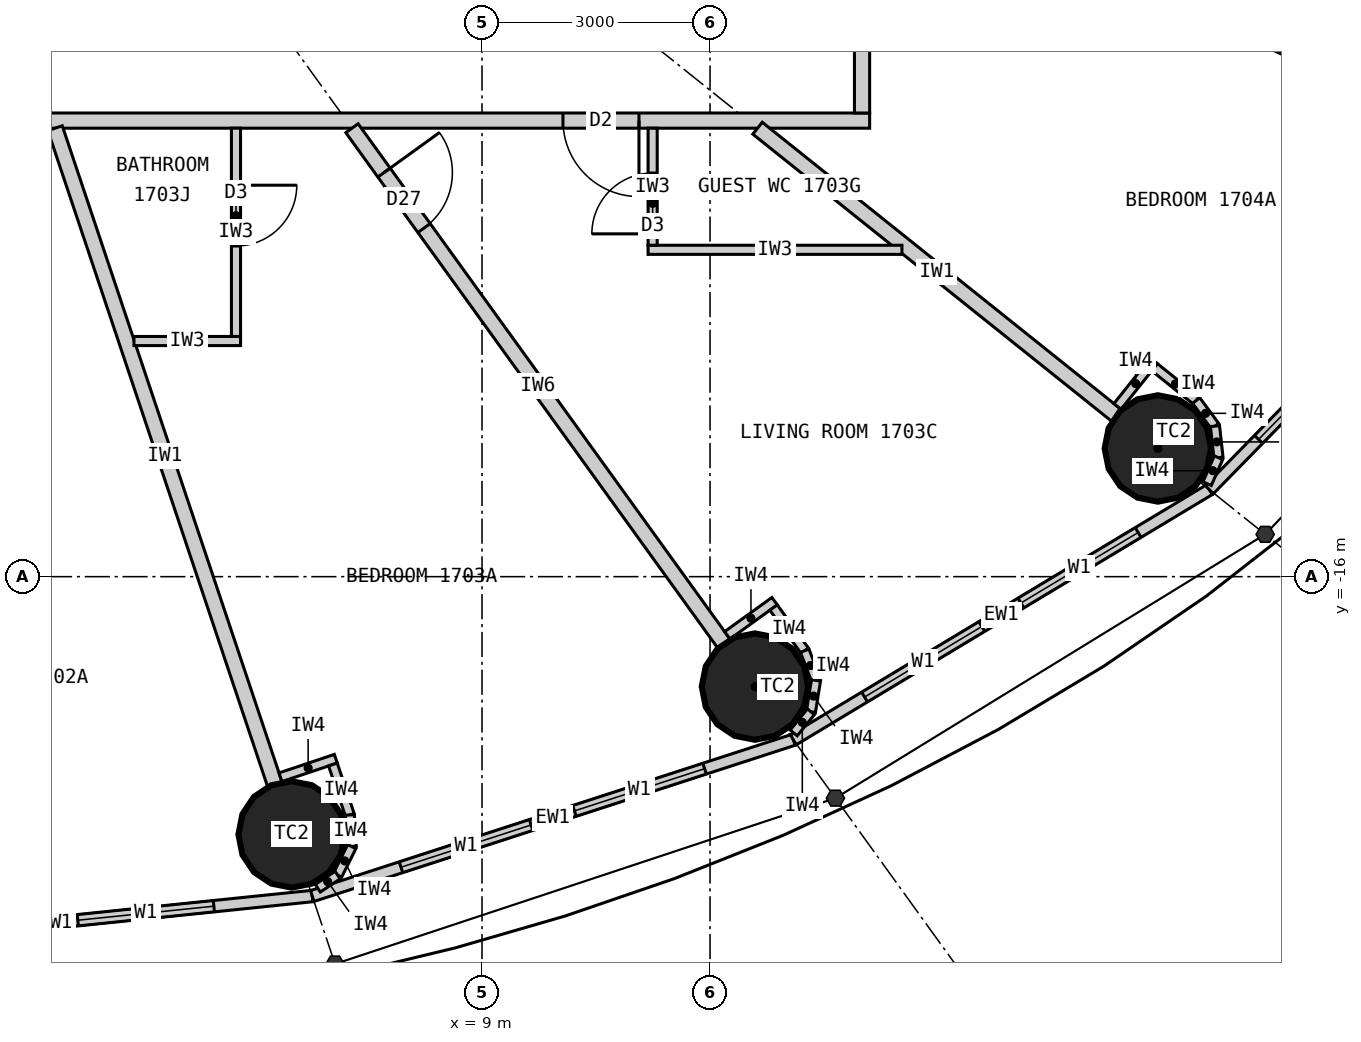
"""IFC4 building model, lengths in metres.
Left out: names, types, materials, properties, quantities, classifications, styles, units other than length and angle.
Written with IfcOpenShell. Run it as: python <this file> out.ifc"""

import sys

from ifc_helpers import new_model, si_unit, direction, frame, frame_2d, origin, origin_2d, place, context, subcontext, project, spatial, rectangle, circle, extrude, element, fill, save


model = new_model("IFC4")
c1 = context("Model", 3, precision=1e-05, world=origin(), true_north=direction((0.0, 1.0)))
c2 = subcontext(c1, "Body", "Model", "MODEL_VIEW")
j1 = project(units=[si_unit("LENGTHUNIT", "METRE"), si_unit("PLANEANGLEUNIT", "RADIAN")], contexts=[c1])
p1 = place(None, origin())
s1 = spatial("IfcSite", under=j1, at=p1, CompositionType="ELEMENT")
p2 = place(p1, origin())
s2 = spatial("IfcBuilding", under=s1, at=p2, CompositionType="ELEMENT")
p3 = place(p2, frame((0.0, 0.0, 70.5)))
s3 = spatial("IfcBuildingStorey", under=s2, at=p3, CompositionType="ELEMENT", Elevation=70.5)
for number, where, z_axis, x_axis in (
    (1, (6.495, -19.391, 0.0), (0.0, 0.0, 1.0), (1.0, 0.0, 0.0)),
    (2, (12.591, -17.447, 0.0), (0.0, 0.0, 1.0), (1.0, 0.0, 0.0)),
    (3, (17.892, -14.313, 0.0), (0.0, 0.0, 1.0), (1.0, 0.0, 0.0)),
):
    element("IfcColumn", number, at=place(p3, frame(where, z_axis=z_axis, x_axis=x_axis)), inside=s3, PredefinedType="COLUMN", context=c2, shape_type="SweptSolid", body=[
        extrude(circle(Radius=0.7, at=origin_2d()), origin(), (0.0, 0.0, 1.0), 3.3),
    ])
p4 = place(p3, frame((0.0, -20.9, 0.0), z_axis=(0.0, 0.0, 1.0), x_axis=(0.994721394369, 0.102612609291, 0.0)))
e4 = element("IfcWall", 4, at=p4, inside=s3, PredefinedType="ELEMENTEDWALL", context=c2, shape_type="SweptSolid", body=[
    extrude(rectangle(XDim=6.802, YDim=0.15, at=frame_2d((3.401, 0.0))), origin(), (0.0, 0.0, 1.0), 3.12),
])
p5 = place(p4, frame((1.301, 0.0, 0.9)))
e5 = element("IfcOpeningElement", 5, at=p5, cuts=e4, PredefinedType="OPENING", context=c2, shape_type="SweptSolid", body=[
    extrude(rectangle(XDim=1.8, YDim=1.9, at=frame_2d((0.9, 0.95))), frame((0.0, 0.085, 0.0), z_axis=(0.0, -1.0, 0.0), x_axis=(1.0, 0.0, 0.0)), (0.0, 0.0, 1.0), 0.17),
])
p6 = place(p4, frame((3.701, 0.0, 0.9)))
e6 = element("IfcOpeningElement", 6, at=p6, cuts=e4, PredefinedType="OPENING", context=c2, shape_type="SweptSolid", body=[
    extrude(rectangle(XDim=1.8, YDim=1.9, at=frame_2d((0.9, 0.95))), frame((0.0, 0.085, 0.0), z_axis=(0.0, -1.0, 0.0), x_axis=(1.0, 0.0, 0.0)), (0.0, 0.0, 1.0), 0.17),
])
p7 = place(p3, frame((6.766, -20.202, 0.0), z_axis=(0.0, 0.0, 1.0), x_axis=(0.951137534625, 0.308767534285, 0.0)))
e7 = element("IfcWall", 7, at=p7, inside=s3, PredefinedType="ELEMENTEDWALL", context=c2, shape_type="SweptSolid", body=[
    extrude(rectangle(XDim=6.655, YDim=0.15, at=frame_2d((3.328, 0.0))), origin(), (0.0, 0.0, 1.0), 3.12),
])
p8 = place(p7, frame((1.228, 0.0, 0.9)))
e8 = element("IfcOpeningElement", 8, at=p8, cuts=e7, PredefinedType="OPENING", context=c2, shape_type="SweptSolid", body=[
    extrude(rectangle(XDim=1.8, YDim=1.9, at=frame_2d((0.9, 0.95))), frame((0.0, 0.085, 0.0), z_axis=(0.0, -1.0, 0.0), x_axis=(1.0, 0.0, 0.0)), (0.0, 0.0, 1.0), 0.17),
])
p9 = place(p7, frame((3.628, 0.0, 0.9)))
e9 = element("IfcOpeningElement", 9, at=p9, cuts=e7, PredefinedType="OPENING", context=c2, shape_type="SweptSolid", body=[
    extrude(rectangle(XDim=1.8, YDim=1.9, at=frame_2d((0.9, 0.95))), frame((0.0, 0.085, 0.0), z_axis=(0.0, -1.0, 0.0), x_axis=(1.0, 0.0, 0.0)), (0.0, 0.0, 1.0), 0.17),
])
p10 = place(p3, frame((13.096, -18.147, 0.0), z_axis=(0.0, 0.0, 1.0), x_axis=(0.856983180864, 0.515344377787, 0.0)))
e10 = element("IfcWall", 10, at=p10, inside=s3, PredefinedType="ELEMENTEDWALL", context=c2, shape_type="SweptSolid", body=[
    extrude(rectangle(XDim=6.386, YDim=0.15, at=frame_2d((3.193, 0.0))), origin(), (0.0, 0.0, 1.0), 3.12),
])
p11 = place(p10, frame((1.093, 0.0, 0.9)))
e11 = element("IfcOpeningElement", 11, at=p11, cuts=e10, PredefinedType="OPENING", context=c2, shape_type="SweptSolid", body=[
    extrude(rectangle(XDim=1.8, YDim=1.9, at=frame_2d((0.9, 0.95))), frame((0.0, 0.085, 0.0), z_axis=(0.0, -1.0, 0.0), x_axis=(1.0, 0.0, 0.0)), (0.0, 0.0, 1.0), 0.17),
])
p12 = place(p10, frame((3.493, 0.0, 0.9)))
e12 = element("IfcOpeningElement", 12, at=p12, cuts=e10, PredefinedType="OPENING", context=c2, shape_type="SweptSolid", body=[
    extrude(rectangle(XDim=1.8, YDim=1.9, at=frame_2d((0.9, 0.95))), frame((0.0, 0.085, 0.0), z_axis=(0.0, -1.0, 0.0), x_axis=(1.0, 0.0, 0.0)), (0.0, 0.0, 1.0), 0.17),
])
p13 = place(p3, frame((18.57, -14.856, 0.0), z_axis=(0.0, 0.0, 1.0), x_axis=(0.699602905915, 0.714531856557, 0.0)))
e13 = element("IfcWall", 13, at=p13, inside=s3, PredefinedType="ELEMENTEDWALL", context=c2, shape_type="SweptSolid", body=[
    extrude(rectangle(XDim=6.051, YDim=0.15, at=frame_2d((3.025, 0.0))), origin(), (0.0, 0.0, 1.0), 3.12),
])
p14 = place(p13, frame((0.926, 0.0, 0.9)))
e14 = element("IfcOpeningElement", 14, at=p14, cuts=e13, PredefinedType="OPENING", context=c2, shape_type="SweptSolid", body=[
    extrude(rectangle(XDim=1.8, YDim=1.9, at=frame_2d((0.9, 0.95))), frame((0.0, 0.085, 0.0), z_axis=(0.0, -1.0, 0.0), x_axis=(1.0, 0.0, 0.0)), (0.0, 0.0, 1.0), 0.17),
])
p15 = place(p13, frame((3.325, 0.0, 0.9)))
e15 = element("IfcOpeningElement", 15, at=p15, cuts=e13, PredefinedType="OPENING", context=c2, shape_type="SweptSolid", body=[
    extrude(rectangle(XDim=1.8, YDim=1.9, at=frame_2d((0.9, 0.95))), frame((0.0, 0.085, 0.0), z_axis=(0.0, -1.0, 0.0), x_axis=(1.0, 0.0, 0.0)), (0.0, 0.0, 1.0), 0.17),
])
p16 = place(p3, frame((14.1, -10.0, 0.0), z_axis=(0.0, 0.0, 1.0), x_axis=(-1.0, 0.0, 0.0)))
e16 = element("IfcWall", 16, at=p16, inside=s3, PredefinedType="PARTITIONING", context=c2, shape_type="SweptSolid", body=[
    extrude(rectangle(XDim=28.2, YDim=0.2, at=frame_2d((14.1, 0.0))), origin(), (0.0, 0.0, 1.0), 3.12),
])
p17 = place(p16, frame((24.165, 0.0, 0.0)))
e17 = element("IfcOpeningElement", 17, at=p17, cuts=e16, PredefinedType="OPENING", context=c2, shape_type="SweptSolid", body=[
    extrude(rectangle(XDim=1.0, YDim=2.2, at=frame_2d((0.5, 1.1))), frame((0.0, 0.11, 0.0), z_axis=(0.0, -1.0, 0.0), x_axis=(1.0, 0.0, 0.0)), (0.0, 0.0, 1.0), 0.22),
])
p18 = place(p16, frame((14.923, 0.0, 0.0)))
e18 = element("IfcOpeningElement", 18, at=p18, cuts=e16, PredefinedType="OPENING", context=c2, shape_type="SweptSolid", body=[
    extrude(rectangle(XDim=1.0, YDim=2.2, at=frame_2d((0.5, 1.1))), frame((0.0, 0.11, 0.0), z_axis=(0.0, -1.0, 0.0), x_axis=(1.0, 0.0, 0.0)), (0.0, 0.0, 1.0), 0.22),
])
p19 = place(p16, frame((3.035, 0.0, 0.0)))
e19 = element("IfcOpeningElement", 19, at=p19, cuts=e16, PredefinedType="OPENING", context=c2, shape_type="SweptSolid", body=[
    extrude(rectangle(XDim=1.0, YDim=2.2, at=frame_2d((0.5, 1.1))), frame((0.0, 0.11, 0.0), z_axis=(0.0, -1.0, 0.0), x_axis=(1.0, 0.0, 0.0)), (0.0, 0.0, 1.0), 0.22),
])
p20 = place(p3, frame((3.383, -10.1, 0.0), z_axis=(0.0, 0.0, 1.0), x_axis=(0.31759592231, -0.948226149256, 0.0)))
e20 = element("IfcWall", 20, at=p20, inside=s3, PredefinedType="PARTITIONING", context=c2, shape_type="SweptSolid", body=[
    extrude(rectangle(XDim=9.098, YDim=0.2, at=frame_2d((4.549, 0.0))), origin(), (0.0, 0.0, 1.0), 2.32),
])
p21 = place(p3, frame((7.289, -10.1, 0.0), z_axis=(0.0, 0.0, 1.0), x_axis=(0.585198353053, -0.810890182197, 0.0)))
e21 = element("IfcWall", 21, at=p21, inside=s3, PredefinedType="PARTITIONING", context=c2, shape_type="SweptSolid", body=[
    extrude(rectangle(XDim=8.36, YDim=0.2, at=frame_2d((4.18, 0.0))), origin(), (0.0, 0.0, 1.0), 2.32),
])
p22 = place(p21, frame((0.72, 0.0, 0.0)))
e22 = element("IfcOpeningElement", 22, at=p22, cuts=e21, PredefinedType="OPENING", context=c2, shape_type="SweptSolid", body=[
    extrude(rectangle(XDim=0.9, YDim=2.1, at=frame_2d((0.45, 1.05))), frame((0.0, 0.11, 0.0), z_axis=(0.0, -1.0, 0.0), x_axis=(1.0, 0.0, 0.0)), (0.0, 0.0, 1.0), 0.22),
])
p23 = place(p3, frame((12.625, -10.1, 0.0), z_axis=(0.0, 0.0, 1.0), x_axis=(0.780892451574, -0.624665493744, 0.0)))
e23 = element("IfcWall", 23, at=p23, inside=s3, PredefinedType="PARTITIONING", context=c2, shape_type="SweptSolid", body=[
    extrude(rectangle(XDim=6.045, YDim=0.2, at=frame_2d((3.022, 0.0))), origin(), (0.0, 0.0, 1.0), 2.32),
])
p24 = place(p3, frame((14.1, -6.512, 0.0), z_axis=(0.0, 0.0, 1.0), x_axis=(0.907832871056, -0.419332181247, 0.0)))
e24 = element("IfcWall", 24, at=p24, inside=s3, PredefinedType="PARTITIONING", context=c2, shape_type="SweptSolid", body=[
    extrude(rectangle(XDim=8.023, YDim=0.2, at=frame_2d((4.011, 0.0))), origin(), (0.0, 0.0, 1.0), 2.32),
])
p25 = place(p24, frame((4.17, 0.0, 0.0)))
e25 = element("IfcOpeningElement", 25, at=p25, cuts=e24, PredefinedType="OPENING", context=c2, shape_type="SweptSolid", body=[
    extrude(rectangle(XDim=0.9, YDim=2.1, at=frame_2d((0.45, 1.05))), frame((0.0, 0.11, 0.0), z_axis=(0.0, -1.0, 0.0), x_axis=(1.0, 0.0, 0.0)), (0.0, 0.0, 1.0), 0.22),
])
p26 = place(p3, frame((4.421, -12.9, 0.0), z_axis=(0.0, 0.0, 1.0), x_axis=(1.0, 0.0, 0.0)))
e26 = element("IfcWall", 26, at=p26, inside=s3, PredefinedType="PARTITIONING", context=c2, shape_type="SweptSolid", body=[
    extrude(rectangle(XDim=1.402, YDim=0.12, at=frame_2d((0.701, 0.0))), origin(), (0.0, 0.0, 1.0), 3.12),
])
p27 = place(p3, frame((5.763, -10.1, 0.0), z_axis=(0.0, 0.0, 1.0), x_axis=(0.0, -1.0, 0.0)))
e27 = element("IfcWall", 27, at=p27, inside=s3, PredefinedType="PARTITIONING", context=c2, shape_type="SweptSolid", body=[
    extrude(rectangle(XDim=2.74, YDim=0.12, at=frame_2d((1.37, 0.0))), origin(), (0.0, 0.0, 1.0), 3.12),
])
p28 = place(p27, frame((0.75, 0.0, 0.0)))
e28 = element("IfcOpeningElement", 28, at=p28, cuts=e27, PredefinedType="OPENING", context=c2, shape_type="SweptSolid", body=[
    extrude(rectangle(XDim=0.8, YDim=2.1, at=frame_2d((0.4, 1.05))), frame((0.0, 0.07, 0.0), z_axis=(0.0, -1.0, 0.0), x_axis=(1.0, 0.0, 0.0)), (0.0, 0.0, 1.0), 0.14),
])
p29 = place(p3, frame((14.525, -11.7, 0.0), z_axis=(0.0, 0.0, 1.0), x_axis=(-1.0, 0.0, 0.0)))
e29 = element("IfcWall", 29, at=p29, inside=s3, PredefinedType="PARTITIONING", context=c2, shape_type="SweptSolid", body=[
    extrude(rectangle(XDim=3.34, YDim=0.12, at=frame_2d((1.67, 0.0))), origin(), (0.0, 0.0, 1.0), 3.12),
])
p30 = place(p3, frame((11.245, -10.1, 0.0), z_axis=(0.0, 0.0, 1.0), x_axis=(0.0, -1.0, 0.0)))
e30 = element("IfcWall", 30, at=p30, inside=s3, PredefinedType="PARTITIONING", context=c2, shape_type="SweptSolid", body=[
    extrude(rectangle(XDim=1.54, YDim=0.12, at=frame_2d((0.77, 0.0))), origin(), (0.0, 0.0, 1.0), 3.12),
])
p31 = place(p30, frame((0.59, 0.0, 0.0)))
e31 = element("IfcOpeningElement", 31, at=p31, cuts=e30, PredefinedType="OPENING", context=c2, shape_type="SweptSolid", body=[
    extrude(rectangle(XDim=0.8, YDim=2.1, at=frame_2d((0.4, 1.05))), frame((0.0, 0.07, 0.0), z_axis=(0.0, -1.0, 0.0), x_axis=(1.0, 0.0, 0.0)), (0.0, 0.0, 1.0), 0.14),
])
p32 = place(p3, frame((14.0, -9.9, 0.0), z_axis=(0.0, 0.0, 1.0), x_axis=(0.0, 1.0, 0.0)))
e32 = element("IfcWall", 32, at=p32, inside=s3, PredefinedType="PARTITIONING", context=c2, shape_type="SweptSolid", body=[
    extrude(rectangle(XDim=13.232, YDim=0.2, at=frame_2d((6.616, 0.0))), origin(), (0.0, 0.0, 1.0), 3.12),
])
p33 = place(p32, frame((4.948, 0.0, 0.0)))
e33 = element("IfcOpeningElement", 33, at=p33, cuts=e32, PredefinedType="OPENING", context=c2, shape_type="SweptSolid", body=[
    extrude(rectangle(XDim=1.0, YDim=2.2, at=frame_2d((0.5, 1.1))), frame((0.0, 0.11, 0.0), z_axis=(0.0, -1.0, 0.0), x_axis=(1.0, 0.0, 0.0)), (0.0, 0.0, 1.0), 0.22),
])
p34 = place(p32, frame((8.718, 0.0, 0.0)))
e34 = element("IfcOpeningElement", 34, at=p34, cuts=e32, PredefinedType="OPENING", context=c2, shape_type="SweptSolid", body=[
    extrude(rectangle(XDim=1.0, YDim=2.2, at=frame_2d((0.5, 1.1))), frame((0.0, 0.11, 0.0), z_axis=(0.0, -1.0, 0.0), x_axis=(1.0, 0.0, 0.0)), (0.0, 0.0, 1.0), 0.22),
])
p35 = place(p32, frame((11.74, 0.0, 0.0)))
e35 = element("IfcOpeningElement", 35, at=p35, cuts=e32, PredefinedType="OPENING", context=c2, shape_type="SweptSolid", body=[
    extrude(rectangle(XDim=1.0, YDim=2.2, at=frame_2d((0.5, 1.1))), frame((0.0, 0.11, 0.0), z_axis=(0.0, -1.0, 0.0), x_axis=(1.0, 0.0, 0.0)), (0.0, 0.0, 1.0), 0.22),
])
p36 = place(p3, frame((6.348, -18.639, 0.0), z_axis=(0.0, 0.0, 1.0), x_axis=(0.948268951266, 0.317468102437, 0.0)))
e36 = element("IfcWall", 36, at=p36, inside=s3, PredefinedType="PARTITIONING", context=c2, shape_type="SweptSolid", body=[
    extrude(rectangle(XDim=0.768, YDim=0.12, at=frame_2d((0.384, 0.0))), origin(), (0.0, 0.0, 1.0), 3.12),
])
p37 = place(p3, frame((7.038, -18.471, 0.0), z_axis=(0.0, 0.0, 1.0), x_axis=(0.317378466199, -0.9482989556, 0.0)))
e37 = element("IfcWall", 37, at=p37, inside=s3, PredefinedType="PARTITIONING", context=c2, shape_type="SweptSolid", body=[
    extrude(rectangle(XDim=0.7, YDim=0.12, at=frame_2d((0.35, 0.0))), origin(), (0.0, 0.0, 1.0), 3.12),
])
p38 = place(p3, frame((7.26, -19.135, 0.0), z_axis=(0.0, 0.0, 1.0), x_axis=(0.0613238046, -0.99811792439, 0.0)))
e38 = element("IfcWall", 38, at=p38, inside=s3, PredefinedType="PARTITIONING", context=c2, shape_type="SweptSolid", body=[
    extrude(rectangle(XDim=0.418, YDim=0.12, at=frame_2d((0.209, 0.0))), origin(), (0.0, 0.0, 1.0), 3.12),
])
p39 = place(p3, frame((7.286, -19.552, 0.0), z_axis=(0.0, 0.0, 1.0), x_axis=(-0.445810757773, -0.89512723579, 0.0)))
e39 = element("IfcWall", 39, at=p39, inside=s3, PredefinedType="PARTITIONING", context=c2, shape_type="SweptSolid", body=[
    extrude(rectangle(XDim=0.418, YDim=0.12, at=frame_2d((0.209, 0.0))), origin(), (0.0, 0.0, 1.0), 3.12),
])
p40 = place(p3, frame((7.1, -19.926, 0.0), z_axis=(0.0, 0.0, 1.0), x_axis=(-0.833488262509, -0.552537162787, 0.0)))
e40 = element("IfcWall", 40, at=p40, inside=s3, PredefinedType="PARTITIONING", context=c2, shape_type="SweptSolid", body=[
    extrude(rectangle(XDim=0.313, YDim=0.12, at=frame_2d((0.156, 0.0))), origin(), (0.0, 0.0, 1.0), 3.12),
])
p41 = place(p3, frame((12.227, -16.772, 0.0), z_axis=(0.0, 0.0, 1.0), x_axis=(0.810821798253, 0.585293098778, 0.0)))
e41 = element("IfcWall", 41, at=p41, inside=s3, PredefinedType="PARTITIONING", context=c2, shape_type="SweptSolid", body=[
    extrude(rectangle(XDim=0.768, YDim=0.12, at=frame_2d((0.384, 0.0))), origin(), (0.0, 0.0, 1.0), 3.12),
])
p42 = place(p3, frame((12.836, -16.406, 0.0), z_axis=(0.0, 0.0, 1.0), x_axis=(0.585223113993, -0.810872312296, 0.0)))
e42 = element("IfcWall", 42, at=p42, inside=s3, PredefinedType="PARTITIONING", context=c2, shape_type="SweptSolid", body=[
    extrude(rectangle(XDim=0.7, YDim=0.12, at=frame_2d((0.35, 0.0))), origin(), (0.0, 0.0, 1.0), 3.12),
])
p43 = place(p3, frame((13.246, -16.974, 0.0), z_axis=(0.0, 0.0, 1.0), x_axis=(0.355728122235, -0.934589483705, 0.0)))
e43 = element("IfcWall", 43, at=p43, inside=s3, PredefinedType="PARTITIONING", context=c2, shape_type="SweptSolid", body=[
    extrude(rectangle(XDim=0.418, YDim=0.12, at=frame_2d((0.209, 0.0))), origin(), (0.0, 0.0, 1.0), 3.12),
])
p44 = place(p3, frame((13.394, -17.365, 0.0), z_axis=(0.0, 0.0, 1.0), x_axis=(-0.159379276926, -0.987217425943, 0.0)))
e44 = element("IfcWall", 44, at=p44, inside=s3, PredefinedType="PARTITIONING", context=c2, shape_type="SweptSolid", body=[
    extrude(rectangle(XDim=0.418, YDim=0.12, at=frame_2d((0.209, 0.0))), origin(), (0.0, 0.0, 1.0), 3.12),
])
p45 = place(p3, frame((13.328, -17.777, 0.0), z_axis=(0.0, 0.0, 1.0), x_axis=(-0.632276783541, -0.774742582407, 0.0)))
e45 = element("IfcWall", 45, at=p45, inside=s3, PredefinedType="PARTITIONING", context=c2, shape_type="SweptSolid", body=[
    extrude(rectangle(XDim=0.36, YDim=0.12, at=frame_2d((0.18, 0.0))), origin(), (0.0, 0.0, 1.0), 3.12),
])
p46 = place(p3, frame((17.361, -13.76, 0.0), z_axis=(0.0, 0.0, 1.0), x_axis=(0.624501042889, 0.781023973659, 0.0)))
e46 = element("IfcWall", 46, at=p46, inside=s3, PredefinedType="PARTITIONING", context=c2, shape_type="SweptSolid", body=[
    extrude(rectangle(XDim=0.767, YDim=0.12, at=frame_2d((0.384, 0.0))), origin(), (0.0, 0.0, 1.0), 3.12),
])
p47 = place(p3, frame((17.85, -13.246, 0.0), z_axis=(0.0, 0.0, 1.0), x_axis=(0.780902834923, -0.62465251333, 0.0)))
e47 = element("IfcWall", 47, at=p47, inside=s3, PredefinedType="PARTITIONING", context=c2, shape_type="SweptSolid", body=[
    extrude(rectangle(XDim=0.7, YDim=0.12, at=frame_2d((0.35, 0.0))), origin(), (0.0, 0.0, 1.0), 3.12),
])
for number, where, z_axis, x_axis in (
    (48, (18.396, -13.683, 0.0), (0.0, 0.0, 1.0), (0.592, -0.806, 0.0)),
    (49, (18.644, -14.02, 0.0), (0.0, 0.0, 1.0), (0.11, -0.994, 0.0)),
):
    element("IfcWall", number, at=place(p3, frame(where, z_axis=z_axis, x_axis=x_axis)), inside=s3, PredefinedType="PARTITIONING", context=c2, shape_type="SweptSolid", body=[
        extrude(rectangle(XDim=0.418, YDim=0.12, at=frame_2d((0.209, 0.0))), origin(), (0.0, 0.0, 1.0), 3.12),
    ])
p48 = place(p3, frame((18.69, -14.435, 0.0), z_axis=(0.0, 0.0, 1.0), x_axis=(-0.401093412634, -0.91603715773, 0.0)))
e50 = element("IfcWall", 50, at=p48, inside=s3, PredefinedType="PARTITIONING", context=c2, shape_type="SweptSolid", body=[
    extrude(rectangle(XDim=0.373, YDim=0.12, at=frame_2d((0.187, 0.0))), origin(), (0.0, 0.0, 1.0), 3.12),
])
p49 = place(p6, origin())
e51 = element("IfcWindow", 51, at=p49, inside=s3, PartitioningType="SINGLE_PANEL", PredefinedType="WINDOW", context=c2, shape_type="SweptSolid", body=[
    extrude(rectangle(XDim=1.8, YDim=1.9, at=frame_2d((0.9, 0.95))), frame((0.0, 0.03, 0.0), z_axis=(0.0, -1.0, 0.0), x_axis=(1.0, 0.0, 0.0)), (0.0, 0.0, 1.0), 0.06),
])
fill(e6, e51)
p50 = place(p8, origin())
e52 = element("IfcWindow", 52, at=p50, inside=s3, PartitioningType="SINGLE_PANEL", PredefinedType="WINDOW", context=c2, shape_type="SweptSolid", body=[
    extrude(rectangle(XDim=1.8, YDim=1.9, at=frame_2d((0.9, 0.95))), frame((0.0, 0.03, 0.0), z_axis=(0.0, -1.0, 0.0), x_axis=(1.0, 0.0, 0.0)), (0.0, 0.0, 1.0), 0.06),
])
fill(e8, e52)
p51 = place(p9, origin())
e53 = element("IfcWindow", 53, at=p51, inside=s3, PartitioningType="SINGLE_PANEL", PredefinedType="WINDOW", context=c2, shape_type="SweptSolid", body=[
    extrude(rectangle(XDim=1.8, YDim=1.9, at=frame_2d((0.9, 0.95))), frame((0.0, 0.03, 0.0), z_axis=(0.0, -1.0, 0.0), x_axis=(1.0, 0.0, 0.0)), (0.0, 0.0, 1.0), 0.06),
])
fill(e9, e53)
p52 = place(p11, origin())
e54 = element("IfcWindow", 54, at=p52, inside=s3, PartitioningType="SINGLE_PANEL", PredefinedType="WINDOW", context=c2, shape_type="SweptSolid", body=[
    extrude(rectangle(XDim=1.8, YDim=1.9, at=frame_2d((0.9, 0.95))), frame((0.0, 0.03, 0.0), z_axis=(0.0, -1.0, 0.0), x_axis=(1.0, 0.0, 0.0)), (0.0, 0.0, 1.0), 0.06),
])
fill(e11, e54)
p53 = place(p12, origin())
e55 = element("IfcWindow", 55, at=p53, inside=s3, PartitioningType="SINGLE_PANEL", PredefinedType="WINDOW", context=c2, shape_type="SweptSolid", body=[
    extrude(rectangle(XDim=1.8, YDim=1.9, at=frame_2d((0.9, 0.95))), frame((0.0, 0.03, 0.0), z_axis=(0.0, -1.0, 0.0), x_axis=(1.0, 0.0, 0.0)), (0.0, 0.0, 1.0), 0.06),
])
fill(e12, e55)
p54 = place(p14, origin())
e56 = element("IfcWindow", 56, at=p54, inside=s3, PartitioningType="SINGLE_PANEL", PredefinedType="WINDOW", context=c2, shape_type="SweptSolid", body=[
    extrude(rectangle(XDim=1.8, YDim=1.9, at=frame_2d((0.9, 0.95))), frame((0.0, 0.03, 0.0), z_axis=(0.0, -1.0, 0.0), x_axis=(1.0, 0.0, 0.0)), (0.0, 0.0, 1.0), 0.06),
])
fill(e14, e56)
p55 = place(p28, origin())
e57 = element("IfcDoor", 57, at=p55, inside=s3, OperationType="SINGLE_SWING_LEFT", PredefinedType="DOOR", context=c2, shape_type="SweptSolid", body=[
    extrude(rectangle(XDim=0.8, YDim=2.1, at=frame_2d((0.4, 1.05))), frame((0.0, 0.025, 0.0), z_axis=(0.0, -1.0, 0.0), x_axis=(1.0, 0.0, 0.0)), (0.0, 0.0, 1.0), 0.05),
])
fill(e28, e57)
p56 = place(p31, origin())
e58 = element("IfcDoor", 58, at=p56, inside=s3, OperationType="SINGLE_SWING_RIGHT", PredefinedType="DOOR", context=c2, shape_type="SweptSolid", body=[
    extrude(rectangle(XDim=0.8, YDim=2.1, at=frame_2d((0.4, 1.05))), frame((0.0, 0.025, 0.0), z_axis=(0.0, -1.0, 0.0), x_axis=(1.0, 0.0, 0.0)), (0.0, 0.0, 1.0), 0.05),
])
fill(e31, e58)
p57 = place(p19, origin())
e59 = element("IfcDoor", 59, at=p57, inside=s3, OperationType="SINGLE_SWING_LEFT", PredefinedType="DOOR", context=c2, shape_type="SweptSolid", body=[
    extrude(rectangle(XDim=1.0, YDim=2.2, at=frame_2d((0.5, 1.1))), frame((0.0, 0.025, 0.0), z_axis=(0.0, -1.0, 0.0), x_axis=(1.0, 0.0, 0.0)), (0.0, 0.0, 1.0), 0.05),
])
fill(e19, e59)
p58 = place(p22, origin())
e60 = element("IfcDoor", 60, at=p58, inside=s3, OperationType="SINGLE_SWING_LEFT", PredefinedType="DOOR", context=c2, shape_type="SweptSolid", body=[
    extrude(rectangle(XDim=0.9, YDim=2.1, at=frame_2d((0.45, 1.05))), frame((0.0, 0.025, 0.0), z_axis=(0.0, -1.0, 0.0), x_axis=(1.0, 0.0, 0.0)), (0.0, 0.0, 1.0), 0.05),
])
fill(e22, e60)
save(model, sys.argv[1])
